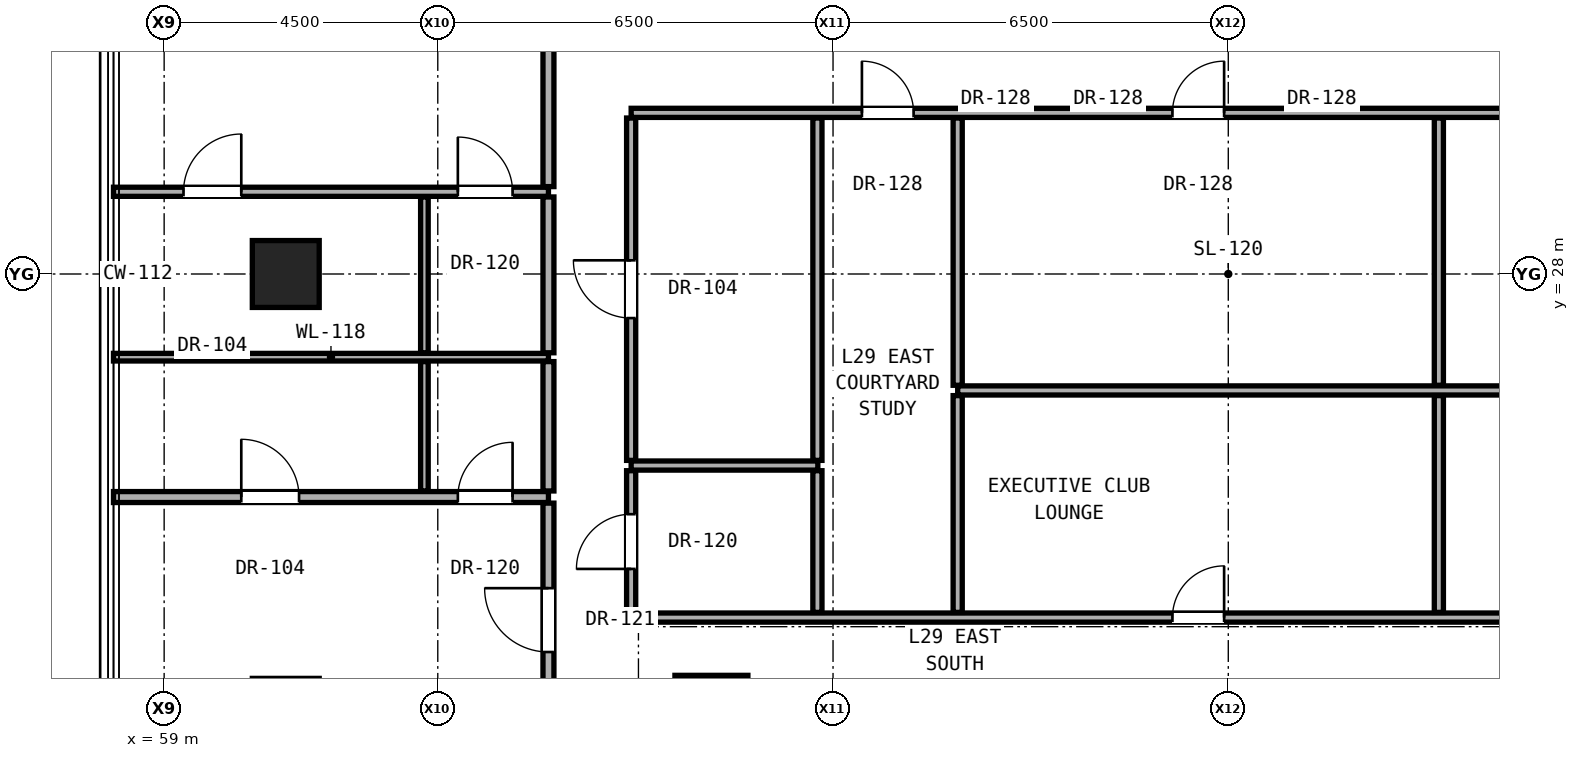
"""IFC4 building model, lengths in metres.
Left out: names, types, materials, properties, quantities, classifications, styles, units other than length and angle.
Written with IfcOpenShell. Run it as: python <this file> out.ifc"""

import sys

from ifc_helpers import new_model, si_unit, direction, frame, frame_2d, origin, origin_2d, place, context, subcontext, project, spatial, rectangle, hollow_rectangle, extrude, element, fill, save


model = new_model("IFC4")
c1 = context("Model", 3, precision=1e-05, world=origin(), true_north=direction((0.0, 1.0)))
c2 = subcontext(c1, "Body", "Model", "MODEL_VIEW")
j1 = project(units=[si_unit("LENGTHUNIT", "METRE"), si_unit("PLANEANGLEUNIT", "RADIAN")], contexts=[c1])
p1 = place(None, origin())
s1 = spatial("IfcSite", under=j1, at=p1, CompositionType="ELEMENT")
p2 = place(p1, origin())
s2 = spatial("IfcBuilding", under=s1, at=p2, CompositionType="ELEMENT")
p3 = place(p2, frame((0.0, 0.0, 104.9)))
s3 = spatial("IfcBuildingStorey", under=s2, at=p3, CompositionType="ELEMENT", Elevation=104.9)
p4 = place(p3, frame((68.0, 20.8, 0.0), z_axis=(0.0, 0.0, 1.0), x_axis=(1.0, 0.0, 0.0)))
e1 = element("IfcColumn", 1, at=p4, inside=s3, PredefinedType="COLUMN", context=c2, shape_type="SweptSolid", body=[
    extrude(rectangle(XDim=1.2, YDim=1.2, at=origin_2d()), origin(), (0.0, 0.0, 1.0), 3.3),
])
p5 = place(p3, frame((61.0, 28.0, 0.0), z_axis=(0.0, 0.0, 1.0), x_axis=(1.0, 0.0, 0.0)))
e2 = element("IfcColumn", 2, at=p5, inside=s3, PredefinedType="COLUMN", context=c2, shape_type="SweptSolid", body=[
    extrude(hollow_rectangle(XDim=1.1, YDim=1.1, WallThickness=0.06, at=origin_2d()), origin(), (0.0, 0.0, 1.0), 3.3),
])
p6 = place(p3, frame((66.68, 22.35, 0.0), z_axis=(0.0, 0.0, 1.0), x_axis=(1.0, 0.0, 0.0)))
e3 = element("IfcWall", 3, at=p6, inside=s3, PredefinedType="PARTITIONING", context=c2, shape_type="SweptSolid", body=[
    extrude(rectangle(XDim=19.5, YDim=0.15, at=frame_2d((9.75, 0.0))), origin(), (0.0, 0.0, 1.0), 2.145),
])
p7 = place(p6, frame((8.902, 0.0, 0.0)))
e4 = element("IfcOpeningElement", 4, at=p7, cuts=e3, PredefinedType="OPENING", context=c2, shape_type="SweptSolid", body=[
    extrude(rectangle(XDim=0.85, YDim=2.01, at=frame_2d((0.425, 1.005))), frame((0.0, 0.085, 0.0), z_axis=(0.0, -1.0, 0.0), x_axis=(1.0, 0.0, 0.0)), (0.0, 0.0, 1.0), 0.17),
])
p8 = place(p6, frame((15.947, 0.0, 0.0)))
e5 = element("IfcOpeningElement", 5, at=p8, cuts=e3, PredefinedType="OPENING", context=c2, shape_type="SweptSolid", body=[
    extrude(rectangle(XDim=0.85, YDim=2.01, at=frame_2d((0.425, 1.005))), frame((0.0, 0.085, 0.0), z_axis=(0.0, -1.0, 0.0), x_axis=(1.0, 0.0, 0.0)), (0.0, 0.0, 1.0), 0.17),
])
p9 = place(p3, frame((58.167, 24.332, 0.0), z_axis=(0.0, 0.0, 1.0), x_axis=(1.0, 0.0, 0.0)))
e6 = element("IfcWall", 6, at=p9, inside=s3, PredefinedType="PARTITIONING", context=c2, shape_type="SweptSolid", body=[
    extrude(rectangle(XDim=7.153, YDim=0.18, at=frame_2d((3.577, 0.0))), origin(), (0.0, 0.0, 1.0), 2.216),
])
p10 = place(p9, frame((2.102, 0.0, 0.0)))
e7 = element("IfcOpeningElement", 7, at=p10, cuts=e6, PredefinedType="OPENING", context=c2, shape_type="SweptSolid", body=[
    extrude(rectangle(XDim=0.95, YDim=2.15, at=frame_2d((0.475, 1.075))), frame((0.0, 0.1, 0.0), z_axis=(0.0, -1.0, 0.0), x_axis=(1.0, 0.0, 0.0)), (0.0, 0.0, 1.0), 0.2),
])
p11 = place(p9, frame((5.663, 0.0, 0.0)))
e8 = element("IfcOpeningElement", 8, at=p11, cuts=e6, PredefinedType="OPENING", context=c2, shape_type="SweptSolid", body=[
    extrude(rectangle(XDim=0.9, YDim=2.1, at=frame_2d((0.45, 1.05))), frame((0.0, 0.1, 0.0), z_axis=(0.0, -1.0, 0.0), x_axis=(1.0, 0.0, 0.0)), (0.0, 0.0, 1.0), 0.2),
])
p12 = place(p3, frame((66.68, 24.85, 0.0), z_axis=(0.0, 0.0, 1.0), x_axis=(1.0, 0.0, 0.0)))
e9 = element("IfcWall", 9, at=p12, inside=s3, PredefinedType="PARTITIONING", context=c2, shape_type="SweptSolid", body=[
    extrude(rectangle(XDim=3.07, YDim=0.15, at=frame_2d((1.535, 0.0))), origin(), (0.0, 0.0, 1.0), 2.145),
])
p13 = place(p3, frame((72.05, 26.085, 0.0), z_axis=(0.0, 0.0, 1.0), x_axis=(1.0, 0.0, 0.0)))
e10 = element("IfcWall", 10, at=p13, inside=s3, PredefinedType="PARTITIONING", context=c2, shape_type="SweptSolid", body=[
    extrude(rectangle(XDim=14.13, YDim=0.15, at=frame_2d((7.065, 0.0))), origin(), (0.0, 0.0, 1.0), 2.145),
])
p14 = place(p3, frame((58.167, 26.632, 0.0), z_axis=(0.0, 0.0, 1.0), x_axis=(1.0, 0.0, 0.0)))
e11 = element("IfcWall", 11, at=p14, inside=s3, PredefinedType="PARTITIONING", context=c2, shape_type="SweptSolid", body=[
    extrude(rectangle(XDim=7.153, YDim=0.125, at=frame_2d((3.577, 0.0))), origin(), (0.0, 0.0, 1.0), 2.216),
])
p15 = place(p3, frame((58.167, 29.352, 0.0), z_axis=(0.0, 0.0, 1.0), x_axis=(1.0, 0.0, 0.0)))
e12 = element("IfcWall", 12, at=p15, inside=s3, PredefinedType="PARTITIONING", context=c2, shape_type="SweptSolid", body=[
    extrude(rectangle(XDim=7.153, YDim=0.15, at=frame_2d((3.577, 0.0))), origin(), (0.0, 0.0, 1.0), 2.216),
])
p16 = place(p15, frame((1.152, 0.0, 0.0)))
e13 = element("IfcOpeningElement", 13, at=p16, cuts=e12, PredefinedType="OPENING", context=c2, shape_type="SweptSolid", body=[
    extrude(rectangle(XDim=0.95, YDim=2.15, at=frame_2d((0.475, 1.075))), frame((0.0, 0.085, 0.0), z_axis=(0.0, -1.0, 0.0), x_axis=(1.0, 0.0, 0.0)), (0.0, 0.0, 1.0), 0.17),
])
p17 = place(p15, frame((5.663, 0.0, 0.0)))
e14 = element("IfcOpeningElement", 14, at=p17, cuts=e12, PredefinedType="OPENING", context=c2, shape_type="SweptSolid", body=[
    extrude(rectangle(XDim=0.9, YDim=2.1, at=frame_2d((0.45, 1.05))), frame((0.0, 0.085, 0.0), z_axis=(0.0, -1.0, 0.0), x_axis=(1.0, 0.0, 0.0)), (0.0, 0.0, 1.0), 0.17),
])
p18 = place(p3, frame((66.68, 30.65, 0.0), z_axis=(0.0, 0.0, 1.0), x_axis=(1.0, 0.0, 0.0)))
e15 = element("IfcWall", 15, at=p18, inside=s3, PredefinedType="PARTITIONING", context=c2, shape_type="SweptSolid", body=[
    extrude(rectangle(XDim=19.5, YDim=0.15, at=frame_2d((9.75, 0.0))), origin(), (0.0, 0.0, 1.0), 2.145),
])
p19 = place(p18, frame((3.795, 0.0, 0.0)))
e16 = element("IfcOpeningElement", 16, at=p19, cuts=e15, PredefinedType="OPENING", context=c2, shape_type="SweptSolid", body=[
    extrude(rectangle(XDim=0.85, YDim=2.01, at=frame_2d((0.425, 1.005))), frame((0.0, 0.085, 0.0), z_axis=(0.0, -1.0, 0.0), x_axis=(1.0, 0.0, 0.0)), (0.0, 0.0, 1.0), 0.17),
])
p20 = place(p18, frame((8.902, 0.0, 0.0)))
e17 = element("IfcOpeningElement", 17, at=p20, cuts=e15, PredefinedType="OPENING", context=c2, shape_type="SweptSolid", body=[
    extrude(rectangle(XDim=0.85, YDim=2.01, at=frame_2d((0.425, 1.005))), frame((0.0, 0.085, 0.0), z_axis=(0.0, -1.0, 0.0), x_axis=(1.0, 0.0, 0.0)), (0.0, 0.0, 1.0), 0.17),
])
p21 = place(p18, frame((15.947, 0.0, 0.0)))
e18 = element("IfcOpeningElement", 18, at=p21, cuts=e15, PredefinedType="OPENING", context=c2, shape_type="SweptSolid", body=[
    extrude(rectangle(XDim=0.85, YDim=2.01, at=frame_2d((0.425, 1.005))), frame((0.0, 0.085, 0.0), z_axis=(0.0, -1.0, 0.0), x_axis=(1.0, 0.0, 0.0)), (0.0, 0.0, 1.0), 0.17),
])
p22 = place(p3, frame((63.28, 24.432, 0.0), z_axis=(0.0, 0.0, 1.0), x_axis=(0.0, 1.0, 0.0)))
e19 = element("IfcWall", 19, at=p22, inside=s3, PredefinedType="PARTITIONING", context=c2, shape_type="SweptSolid", body=[
    extrude(rectangle(XDim=2.128, YDim=0.125, at=frame_2d((1.064, 0.0))), origin(), (0.0, 0.0, 1.0), 3.08),
])
p23 = place(p3, frame((63.28, 26.705, 0.0), z_axis=(0.0, 0.0, 1.0), x_axis=(0.0, 1.0, 0.0)))
e20 = element("IfcWall", 20, at=p23, inside=s3, PredefinedType="PARTITIONING", context=c2, shape_type="SweptSolid", body=[
    extrude(rectangle(XDim=2.562, YDim=0.125, at=frame_2d((1.281, 0.0))), origin(), (0.0, 0.0, 1.0), 2.299),
])
p24 = place(p3, frame((65.32, 20.385, 0.0), z_axis=(0.0, 0.0, 1.0), x_axis=(0.0, 1.0, 0.0)))
e21 = element("IfcWall", 21, at=p24, inside=s3, PredefinedType="PARTITIONING", context=c2, shape_type="SweptSolid", body=[
    extrude(rectangle(XDim=3.847, YDim=0.18, at=frame_2d((1.923, 0.0))), origin(), (0.0, 0.0, 1.0), 2.472),
])
p25 = place(p24, frame((1.398, 0.0, 0.0)))
e22 = element("IfcOpeningElement", 22, at=p25, cuts=e21, PredefinedType="OPENING", context=c2, shape_type="SweptSolid", body=[
    extrude(rectangle(XDim=1.05, YDim=2.2, at=frame_2d((0.525, 1.1))), frame((0.0, 0.1, 0.0), z_axis=(0.0, -1.0, 0.0), x_axis=(1.0, 0.0, 0.0)), (0.0, 0.0, 1.0), 0.2),
])
p26 = place(p3, frame((65.32, 24.432, 0.0), z_axis=(0.0, 0.0, 1.0), x_axis=(0.0, 1.0, 0.0)))
e23 = element("IfcWall", 23, at=p26, inside=s3, PredefinedType="PARTITIONING", context=c2, shape_type="SweptSolid", body=[
    extrude(rectangle(XDim=2.128, YDim=0.18, at=frame_2d((1.064, 0.0))), origin(), (0.0, 0.0, 1.0), 3.08),
])
p27 = place(p3, frame((65.32, 26.705, 0.0), z_axis=(0.0, 0.0, 1.0), x_axis=(0.0, 1.0, 0.0)))
e24 = element("IfcWall", 24, at=p27, inside=s3, PredefinedType="PARTITIONING", context=c2, shape_type="SweptSolid", body=[
    extrude(rectangle(XDim=2.562, YDim=0.18, at=frame_2d((1.281, 0.0))), origin(), (0.0, 0.0, 1.0), 2.299),
])
p28 = place(p3, frame((65.32, 29.437, 0.0), z_axis=(0.0, 0.0, 1.0), x_axis=(0.0, 1.0, 0.0)))
e25 = element("IfcWall", 25, at=p28, inside=s3, PredefinedType="PARTITIONING", context=c2, shape_type="SweptSolid", body=[
    extrude(rectangle(XDim=6.178, YDim=0.18, at=frame_2d((3.089, 0.0))), origin(), (0.0, 0.0, 1.0), 2.472),
])
p29 = place(p28, frame((2.564, 0.0, 0.0)))
e26 = element("IfcOpeningElement", 26, at=p29, cuts=e25, PredefinedType="OPENING", context=c2, shape_type="SweptSolid", body=[
    extrude(rectangle(XDim=1.05, YDim=2.2, at=frame_2d((0.525, 1.1))), frame((0.0, 0.1, 0.0), z_axis=(0.0, -1.0, 0.0), x_axis=(1.0, 0.0, 0.0)), (0.0, 0.0, 1.0), 0.2),
])
p30 = place(p3, frame((66.68, 22.435, 0.0), z_axis=(0.0, 0.0, 1.0), x_axis=(0.0, 1.0, 0.0)))
e27 = element("IfcWall", 27, at=p30, inside=s3, PredefinedType="PARTITIONING", context=c2, shape_type="SweptSolid", body=[
    extrude(rectangle(XDim=2.33, YDim=0.15, at=frame_2d((1.165, 0.0))), origin(), (0.0, 0.0, 1.0), 3.08),
])
p31 = place(p30, frame((0.715, 0.0, 0.0)))
e28 = element("IfcOpeningElement", 28, at=p31, cuts=e27, PredefinedType="OPENING", context=c2, shape_type="SweptSolid", body=[
    extrude(rectangle(XDim=0.9, YDim=2.1, at=frame_2d((0.45, 1.05))), frame((0.0, 0.085, 0.0), z_axis=(0.0, -1.0, 0.0), x_axis=(1.0, 0.0, 0.0)), (0.0, 0.0, 1.0), 0.17),
])
p32 = place(p3, frame((66.68, 24.935, 0.0), z_axis=(0.0, 0.0, 1.0), x_axis=(0.0, 1.0, 0.0)))
e29 = element("IfcWall", 29, at=p32, inside=s3, PredefinedType="PARTITIONING", context=c2, shape_type="SweptSolid", body=[
    extrude(rectangle(XDim=5.63, YDim=0.15, at=frame_2d((2.815, 0.0))), origin(), (0.0, 0.0, 1.0), 2.299),
])
p33 = place(p32, frame((2.34, 0.0, 0.0)))
e30 = element("IfcOpeningElement", 30, at=p33, cuts=e29, PredefinedType="OPENING", context=c2, shape_type="SweptSolid", body=[
    extrude(rectangle(XDim=0.95, YDim=2.15, at=frame_2d((0.475, 1.075))), frame((0.0, 0.085, 0.0), z_axis=(0.0, -1.0, 0.0), x_axis=(1.0, 0.0, 0.0)), (0.0, 0.0, 1.0), 0.17),
])
p34 = place(p3, frame((69.743, 22.435, 0.0), z_axis=(0.0, 0.0, 1.0), x_axis=(0.0, 1.0, 0.0)))
e31 = element("IfcWall", 31, at=p34, inside=s3, PredefinedType="PARTITIONING", context=c2, shape_type="SweptSolid", body=[
    extrude(rectangle(XDim=2.33, YDim=0.15, at=frame_2d((1.165, 0.0))), origin(), (0.0, 0.0, 1.0), 3.08),
])
p35 = place(p3, frame((69.743, 24.935, 0.0), z_axis=(0.0, 0.0, 1.0), x_axis=(0.0, 1.0, 0.0)))
e32 = element("IfcWall", 32, at=p35, inside=s3, PredefinedType="PARTITIONING", context=c2, shape_type="SweptSolid", body=[
    extrude(rectangle(XDim=5.63, YDim=0.15, at=frame_2d((2.815, 0.0))), origin(), (0.0, 0.0, 1.0), 2.145),
])
p36 = place(p3, frame((72.05, 22.435, 0.0), z_axis=(0.0, 0.0, 1.0), x_axis=(0.0, 1.0, 0.0)))
e33 = element("IfcWall", 33, at=p36, inside=s3, PredefinedType="PARTITIONING", context=c2, shape_type="SweptSolid", body=[
    extrude(rectangle(XDim=3.565, YDim=0.15, at=frame_2d((1.782, 0.0))), origin(), (0.0, 0.0, 1.0), 2.609),
])
p37 = place(p3, frame((72.05, 26.17, 0.0), z_axis=(0.0, 0.0, 1.0), x_axis=(0.0, 1.0, 0.0)))
e34 = element("IfcWall", 34, at=p37, inside=s3, PredefinedType="PARTITIONING", context=c2, shape_type="SweptSolid", body=[
    extrude(rectangle(XDim=4.395, YDim=0.15, at=frame_2d((2.198, 0.0))), origin(), (0.0, 0.0, 1.0), 2.145),
])
p38 = place(p3, frame((79.963, 22.435, 0.0), z_axis=(0.0, 0.0, 1.0), x_axis=(0.0, 1.0, 0.0)))
e35 = element("IfcWall", 35, at=p38, inside=s3, PredefinedType="PARTITIONING", context=c2, shape_type="SweptSolid", body=[
    extrude(rectangle(XDim=3.565, YDim=0.15, at=frame_2d((1.782, 0.0))), origin(), (0.0, 0.0, 1.0), 3.08),
])
p39 = place(p3, frame((79.963, 26.17, 0.0), z_axis=(0.0, 0.0, 1.0), x_axis=(0.0, 1.0, 0.0)))
e36 = element("IfcWall", 36, at=p39, inside=s3, PredefinedType="PARTITIONING", context=c2, shape_type="SweptSolid", body=[
    extrude(rectangle(XDim=4.395, YDim=0.15, at=frame_2d((2.198, 0.0))), origin(), (0.0, 0.0, 1.0), 2.145),
])
p40 = place(p31, origin())
e37 = element("IfcDoor", 37, at=p40, inside=s3, OperationType="SINGLE_SWING_LEFT", PredefinedType="DOOR", context=c2, shape_type="SweptSolid", body=[
    extrude(rectangle(XDim=0.9, YDim=2.1, at=frame_2d((0.45, 1.05))), frame((0.0, 0.025, 0.0), z_axis=(0.0, -1.0, 0.0), x_axis=(1.0, 0.0, 0.0)), (0.0, 0.0, 1.0), 0.05),
])
fill(e28, e37)
p41 = place(p25, origin())
e38 = element("IfcDoor", 38, at=p41, inside=s3, OperationType="SINGLE_SWING_RIGHT", PredefinedType="DOOR", context=c2, shape_type="SweptSolid", body=[
    extrude(rectangle(XDim=1.05, YDim=2.2, at=frame_2d((0.525, 1.1))), frame((0.0, 0.025, 0.0), z_axis=(0.0, -1.0, 0.0), x_axis=(1.0, 0.0, 0.0)), (0.0, 0.0, 1.0), 0.05),
])
fill(e22, e38)
p42 = place(p10, origin())
e39 = element("IfcDoor", 39, at=p42, inside=s3, OperationType="SINGLE_SWING_LEFT", PredefinedType="DOOR", context=c2, shape_type="SweptSolid", body=[
    extrude(rectangle(XDim=0.95, YDim=2.15, at=frame_2d((0.475, 1.075))), frame((0.0, 0.025, 0.0), z_axis=(0.0, -1.0, 0.0), x_axis=(1.0, 0.0, 0.0)), (0.0, 0.0, 1.0), 0.05),
])
fill(e7, e39)
p43 = place(p11, origin())
e40 = element("IfcDoor", 40, at=p43, inside=s3, OperationType="SINGLE_SWING_RIGHT", PredefinedType="DOOR", context=c2, shape_type="SweptSolid", body=[
    extrude(rectangle(XDim=0.9, YDim=2.1, at=frame_2d((0.45, 1.05))), frame((0.0, 0.025, 0.0), z_axis=(0.0, -1.0, 0.0), x_axis=(1.0, 0.0, 0.0)), (0.0, 0.0, 1.0), 0.05),
])
fill(e8, e40)
p44 = place(p16, origin())
e41 = element("IfcDoor", 41, at=p44, inside=s3, OperationType="SINGLE_SWING_RIGHT", PredefinedType="DOOR", context=c2, shape_type="SweptSolid", body=[
    extrude(rectangle(XDim=0.95, YDim=2.15, at=frame_2d((0.475, 1.075))), frame((0.0, 0.025, 0.0), z_axis=(0.0, -1.0, 0.0), x_axis=(1.0, 0.0, 0.0)), (0.0, 0.0, 1.0), 0.05),
])
fill(e13, e41)
p45 = place(p17, origin())
e42 = element("IfcDoor", 42, at=p45, inside=s3, OperationType="SINGLE_SWING_LEFT", PredefinedType="DOOR", context=c2, shape_type="SweptSolid", body=[
    extrude(rectangle(XDim=0.9, YDim=2.1, at=frame_2d((0.45, 1.05))), frame((0.0, 0.025, 0.0), z_axis=(0.0, -1.0, 0.0), x_axis=(1.0, 0.0, 0.0)), (0.0, 0.0, 1.0), 0.05),
])
fill(e14, e42)
p46 = place(p33, origin())
e43 = element("IfcDoor", 43, at=p46, inside=s3, OperationType="SINGLE_SWING_RIGHT", PredefinedType="DOOR", context=c2, shape_type="SweptSolid", body=[
    extrude(rectangle(XDim=0.95, YDim=2.15, at=frame_2d((0.475, 1.075))), frame((0.0, 0.025, 0.0), z_axis=(0.0, -1.0, 0.0), x_axis=(1.0, 0.0, 0.0)), (0.0, 0.0, 1.0), 0.05),
])
fill(e30, e43)
p47 = place(p19, origin())
e44 = element("IfcDoor", 44, at=p47, inside=s3, OperationType="SINGLE_SWING_LEFT", PredefinedType="DOOR", context=c2, shape_type="SweptSolid", body=[
    extrude(rectangle(XDim=0.85, YDim=2.01, at=frame_2d((0.425, 1.005))), frame((0.0, 0.025, 0.0), z_axis=(0.0, -1.0, 0.0), x_axis=(1.0, 0.0, 0.0)), (0.0, 0.0, 1.0), 0.05),
])
fill(e16, e44)
p48 = place(p7, origin())
e45 = element("IfcDoor", 45, at=p48, inside=s3, OperationType="SINGLE_SWING_RIGHT", PredefinedType="DOOR", context=c2, shape_type="SweptSolid", body=[
    extrude(rectangle(XDim=0.85, YDim=2.01, at=frame_2d((0.425, 1.005))), frame((0.0, 0.025, 0.0), z_axis=(0.0, -1.0, 0.0), x_axis=(1.0, 0.0, 0.0)), (0.0, 0.0, 1.0), 0.05),
])
fill(e4, e45)
p49 = place(p20, origin())
e46 = element("IfcDoor", 46, at=p49, inside=s3, OperationType="SINGLE_SWING_RIGHT", PredefinedType="DOOR", context=c2, shape_type="SweptSolid", body=[
    extrude(rectangle(XDim=0.85, YDim=2.01, at=frame_2d((0.425, 1.005))), frame((0.0, 0.025, 0.0), z_axis=(0.0, -1.0, 0.0), x_axis=(1.0, 0.0, 0.0)), (0.0, 0.0, 1.0), 0.05),
])
fill(e17, e46)
save(model, sys.argv[1])
